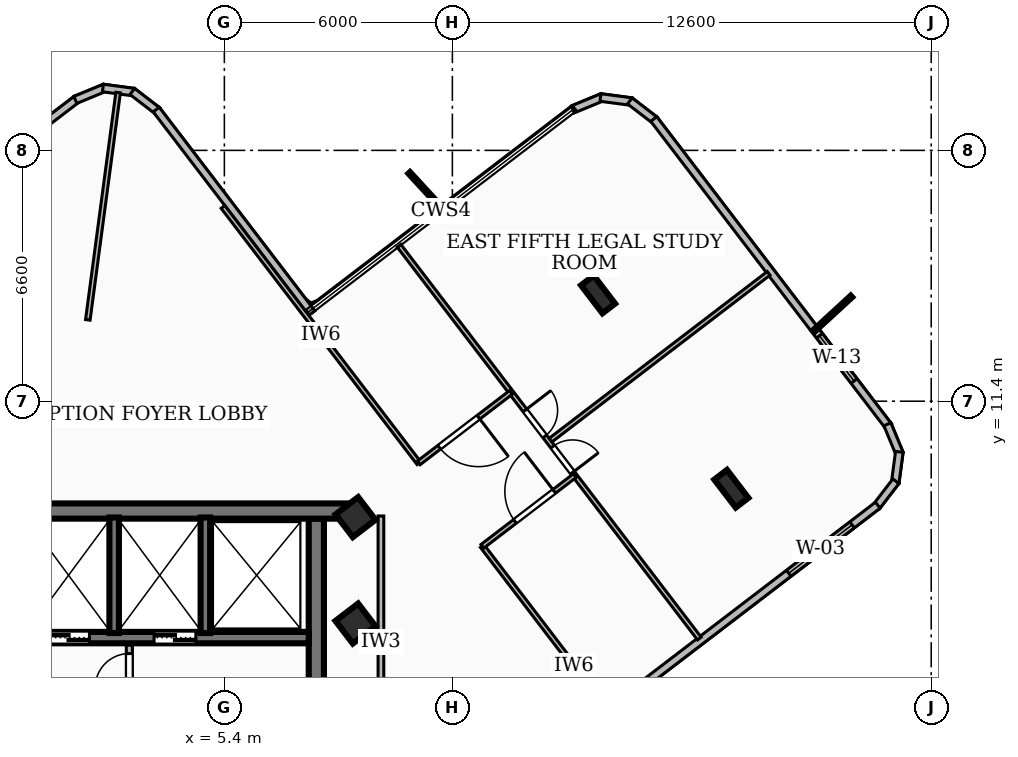
"""IFC4 building model, lengths in metres.
Left out: names, types, materials, properties, quantities, classifications, styles, units other than length and angle.
Written with IfcOpenShell. Run it as: python <this file> out.ifc"""

import sys

from ifc_helpers import new_model, si_unit, direction, frame, frame_2d, origin, origin_2d, place, context, subcontext, project, spatial, rectangle, i_section, extrude, element, fill, save


model = new_model("IFC4")
c1 = context("Model", 3, precision=1e-05, world=origin(), true_north=direction((0.0, 1.0)))
c2 = subcontext(c1, "Body", "Model", "MODEL_VIEW")
j1 = project(units=[si_unit("LENGTHUNIT", "METRE"), si_unit("PLANEANGLEUNIT", "RADIAN")], contexts=[c1])
p1 = place(None, origin())
s1 = spatial("IfcSite", under=j1, at=p1, CompositionType="ELEMENT")
p2 = place(p1, origin())
s2 = spatial("IfcBuilding", under=s1, at=p2, CompositionType="ELEMENT")
p3 = place(p2, frame((0.0, 0.0, 232.56)))
s3 = spatial("IfcBuildingStorey", under=s2, at=p3, CompositionType="ELEMENT", Elevation=232.56)
p4 = place(p3, frame((-8.78, 8.51, 0.0), z_axis=(0.0, 0.0, 1.0), x_axis=(1.0, 0.0, 0.0)))
e1 = element("IfcWall", 1, at=p4, inside=s3, PredefinedType="SHEAR", context=c2, shape_type="SweptSolid", body=[
    extrude(rectangle(XDim=17.56, YDim=0.4, at=frame_2d((8.78, 0.0))), origin(), (0.0, 0.0, 1.0), 3.14),
])
p5 = place(p3, frame((7.82, 8.31, 0.0), z_axis=(0.0, 0.0, 1.0), x_axis=(0.0, -1.0, 0.0)))
e2 = element("IfcWall", 2, at=p5, inside=s3, PredefinedType="SHEAR", context=c2, shape_type="SweptSolid", body=[
    extrude(rectangle(XDim=6.36, YDim=0.4, at=frame_2d((3.18, 0.0))), origin(), (0.0, 0.0, 1.0), 3.14),
])
p6 = place(p3, frame((7.62, 5.18, 0.0), z_axis=(0.0, 0.0, 1.0), x_axis=(-1.0, 0.0, 0.0)))
e3 = element("IfcWall", 3, at=p6, inside=s3, PredefinedType="SOLIDWALL", context=c2, shape_type="SweptSolid", body=[
    extrude(rectangle(XDim=15.24, YDim=0.3, at=frame_2d((7.62, 0.0))), origin(), (0.0, 0.0, 1.0), 3.14),
])
p7 = place(p6, frame((5.77, 0.0, 0.0)))
e4 = element("IfcOpeningElement", 4, at=p7, cuts=e3, PredefinedType="OPENING", context=c2, shape_type="SweptSolid", body=[
    extrude(rectangle(XDim=1.1, YDim=2.15, at=frame_2d((0.55, 1.075))), frame((0.0, 0.16, 0.0), z_axis=(0.0, -1.0, 0.0), x_axis=(1.0, 0.0, 0.0)), (0.0, 0.0, 1.0), 0.32),
])
p8 = place(p6, frame((2.97, 0.0, 0.0)))
e5 = element("IfcOpeningElement", 5, at=p8, cuts=e3, PredefinedType="OPENING", context=c2, shape_type="SweptSolid", body=[
    extrude(rectangle(XDim=1.1, YDim=2.15, at=frame_2d((0.55, 1.075))), frame((0.0, 0.16, 0.0), z_axis=(0.0, -1.0, 0.0), x_axis=(1.0, 0.0, 0.0)), (0.0, 0.0, 1.0), 0.32),
])
p9 = place(p6, frame((7.97, 0.0, 0.0)))
e6 = element("IfcOpeningElement", 6, at=p9, cuts=e3, PredefinedType="OPENING", context=c2, shape_type="SweptSolid", body=[
    extrude(rectangle(XDim=1.0, YDim=2.1, at=frame_2d((0.5, 1.05))), frame((0.0, 0.16, 0.0), z_axis=(0.0, -1.0, 0.0), x_axis=(1.0, 0.0, 0.0)), (0.0, 0.0, 1.0), 0.32),
])
for number, where, z_axis, x_axis in (
    (7, (2.5, 5.3, 0.0), (0.0, 0.0, 1.0), (0.0, 1.0, 0.0)),
    (8, (4.9, 5.3, 0.0), (0.0, 0.0, 1.0), (0.0, 1.0, 0.0)),
):
    element("IfcWall", number, at=place(p3, frame(where, z_axis=z_axis, x_axis=x_axis)), inside=s3, PredefinedType="SOLIDWALL", context=c2, shape_type="SweptSolid", body=[
        extrude(rectangle(XDim=3.04, YDim=0.25, at=frame_2d((1.52, 0.0))), origin(), (0.0, 0.0, 1.0), 3.14),
    ])
for number, where, z_axis, x_axis in (
    (9, (8.85, 5.55, 0.0), (0.0, 0.0, 1.0), (0.794, 0.607, 0.0)),
    (10, (8.85, 8.35, 0.0), (0.0, 0.0, 1.0), (0.794, 0.607, 0.0)),
):
    element("IfcColumn", number, at=place(p3, frame(where, z_axis=z_axis, x_axis=x_axis)), inside=s3, PredefinedType="COLUMN", context=c2, shape_type="SweptSolid", body=[
        extrude(rectangle(XDim=0.75, YDim=0.75, at=origin_2d()), origin(), (0.0, 0.0, 1.0), 3.42),
    ])
for number, where, z_axis, x_axis in (
    (11, (18.741, 9.097, 0.0), (0.0, 0.0, 1.0), (0.794, 0.607, 0.0)),
    (12, (15.234, 14.209, 0.0), (0.0, 0.0, 1.0), (0.794, 0.607, 0.0)),
):
    element("IfcColumn", number, at=place(p3, frame(where, z_axis=z_axis, x_axis=x_axis)), inside=s3, PredefinedType="COLUMN", context=c2, shape_type="SweptSolid", body=[
        extrude(i_section(OverallWidth=0.418, OverallDepth=0.927, WebThickness=0.019, FlangeThickness=0.032, at=origin_2d()), origin(), (0.0, 0.0, 1.0), 3.42),
    ])
p10 = place(p3, frame((-3.406, 15.584, 0.0), z_axis=(0.0, 0.0, 1.0), x_axis=(0.794329901805, 0.60748663121, 0.0)))
e13 = element("IfcWall", 13, at=p10, inside=s3, PredefinedType="SOLIDWALL", context=c2, shape_type="SweptSolid", body=[
    extrude(rectangle(XDim=6.203, YDim=0.2, at=frame_2d((3.101, 0.0))), origin(), (0.0, 0.0, 1.0), 3.14),
])
p11 = place(p3, frame((1.478, 19.327, 0.0), z_axis=(0.0, 0.0, 1.0), x_axis=(0.924091394431, 0.382171551451, 0.0)))
e14 = element("IfcWall", 14, at=p11, inside=s3, PredefinedType="SOLIDWALL", context=c2, shape_type="SweptSolid", body=[
    extrude(rectangle(XDim=0.837, YDim=0.2, at=frame_2d((0.419, 0.0))), origin(), (0.0, 0.0, 1.0), 3.14),
])
p12 = place(p3, frame((2.204, 19.64, 0.0), z_axis=(0.0, 0.0, 1.0), x_axis=(0.99140789753, -0.130806653943, 0.0)))
e15 = element("IfcWall", 15, at=p12, inside=s3, PredefinedType="SOLIDWALL", context=c2, shape_type="SweptSolid", body=[
    extrude(rectangle(XDim=0.825, YDim=0.2, at=frame_2d((0.413, 0.0))), origin(), (0.0, 0.0, 1.0), 3.14),
])
p13 = place(p3, frame((2.977, 19.55, 0.0), z_axis=(0.0, 0.0, 1.0), x_axis=(0.792959338773, -0.609274558022, 0.0)))
e16 = element("IfcWall", 16, at=p13, inside=s3, PredefinedType="SOLIDWALL", context=c2, shape_type="SweptSolid", body=[
    extrude(rectangle(XDim=0.839, YDim=0.2, at=frame_2d((0.419, 0.0))), origin(), (0.0, 0.0, 1.0), 3.14),
])
p14 = place(p3, frame((3.607, 19.074, 0.0), z_axis=(0.0, 0.0, 1.0), x_axis=(0.607308983466, -0.794465731546, 0.0)))
e17 = element("IfcWall", 17, at=p14, inside=s3, PredefinedType="SOLIDWALL", context=c2, shape_type="SweptSolid", body=[
    extrude(rectangle(XDim=6.743, YDim=0.2, at=frame_2d((3.372, 0.0))), origin(), (0.0, 0.0, 1.0), 3.14),
])
p15 = place(p3, frame((14.57, 19.078, 0.0), z_axis=(0.0, 0.0, 1.0), x_axis=(0.92426142649, 0.38176015442, 0.0)))
e18 = element("IfcWall", 18, at=p15, inside=s3, PredefinedType="SOLIDWALL", context=c2, shape_type="SweptSolid", body=[
    extrude(rectangle(XDim=0.838, YDim=0.2, at=frame_2d((0.419, 0.0))), origin(), (0.0, 0.0, 1.0), 3.14),
])
p16 = place(p3, frame((15.297, 19.391, 0.0), z_axis=(0.0, 0.0, 1.0), x_axis=(0.991369477691, -0.131097516005, 0.0)))
e19 = element("IfcWall", 19, at=p16, inside=s3, PredefinedType="SOLIDWALL", context=c2, shape_type="SweptSolid", body=[
    extrude(rectangle(XDim=0.825, YDim=0.2, at=frame_2d((0.413, 0.0))), origin(), (0.0, 0.0, 1.0), 3.14),
])
p17 = place(p3, frame((16.07, 19.301, 0.0), z_axis=(0.0, 0.0, 1.0), x_axis=(0.792959338773, -0.609274558022, 0.0)))
e20 = element("IfcWall", 20, at=p17, inside=s3, PredefinedType="SOLIDWALL", context=c2, shape_type="SweptSolid", body=[
    extrude(rectangle(XDim=0.839, YDim=0.2, at=frame_2d((0.419, 0.0))), origin(), (0.0, 0.0, 1.0), 3.14),
])
p18 = place(p3, frame((16.7, 18.825, 0.0), z_axis=(0.0, 0.0, 1.0), x_axis=(0.607273554345, -0.794492813179, 0.0)))
e21 = element("IfcWall", 21, at=p18, inside=s3, PredefinedType="SOLIDWALL", context=c2, shape_type="SweptSolid", body=[
    extrude(rectangle(XDim=10.164, YDim=0.2, at=frame_2d((5.082, 0.0))), origin(), (0.0, 0.0, 1.0), 3.14),
])
p19 = place(p18, frame((7.178, 0.0, 0.85)))
e22 = element("IfcOpeningElement", 22, at=p19, cuts=e21, PredefinedType="OPENING", context=c2, shape_type="SweptSolid", body=[
    extrude(rectangle(XDim=1.5, YDim=1.8, at=frame_2d((0.75, 0.9))), frame((0.0, 0.11, 0.0), z_axis=(0.0, -1.0, 0.0), x_axis=(1.0, 0.0, 0.0)), (0.0, 0.0, 1.0), 0.22),
])
p20 = place(p3, frame((22.847, 10.793, 0.0), z_axis=(0.0, 0.0, 1.0), x_axis=(0.383166624649, -0.923679239647, 0.0)))
e23 = element("IfcWall", 23, at=p20, inside=s3, PredefinedType="SOLIDWALL", context=c2, shape_type="SweptSolid", body=[
    extrude(rectangle(XDim=0.838, YDim=0.2, at=frame_2d((0.419, 0.0))), origin(), (0.0, 0.0, 1.0), 3.14),
])
p21 = place(p3, frame((23.161, 10.067, 0.0), z_axis=(0.0, 0.0, 1.0), x_axis=(-0.131969898809, -0.991253724234, 0.0)))
e24 = element("IfcWall", 24, at=p21, inside=s3, PredefinedType="SOLIDWALL", context=c2, shape_type="SweptSolid", body=[
    extrude(rectangle(XDim=0.825, YDim=0.2, at=frame_2d((0.413, 0.0))), origin(), (0.0, 0.0, 1.0), 3.14),
])
p22 = place(p3, frame((23.07, 9.294, 0.0), z_axis=(0.0, 0.0, 1.0), x_axis=(-0.609274558022, -0.792959338773, 0.0)))
e25 = element("IfcWall", 25, at=p22, inside=s3, PredefinedType="SOLIDWALL", context=c2, shape_type="SweptSolid", body=[
    extrude(rectangle(XDim=0.839, YDim=0.2, at=frame_2d((0.419, 0.0))), origin(), (0.0, 0.0, 1.0), 3.14),
])
p23 = place(p3, frame((22.594, 8.664, 0.0), z_axis=(0.0, 0.0, 1.0), x_axis=(-0.794406416539, -0.607386569954, 0.0)))
e26 = element("IfcWall", 26, at=p23, inside=s3, PredefinedType="SOLIDWALL", context=c2, shape_type="SweptSolid", body=[
    extrude(rectangle(XDim=8.843, YDim=0.2, at=frame_2d((4.421, 0.0))), origin(), (0.0, 0.0, 1.0), 3.14),
])
p24 = place(p23, frame((0.85, 0.0, 0.85)))
e27 = element("IfcOpeningElement", 27, at=p24, cuts=e26, PredefinedType="OPENING", context=c2, shape_type="SweptSolid", body=[
    extrude(rectangle(XDim=2.1, YDim=2.0, at=frame_2d((1.05, 1.0))), frame((0.0, 0.11, 0.0), z_axis=(0.0, -1.0, 0.0), x_axis=(1.0, 0.0, 0.0)), (0.0, 0.0, 1.0), 0.22),
])
p25 = place(p3, frame((2.9, 2.04, 0.0), z_axis=(0.0, 0.0, 1.0), x_axis=(0.0, 1.0, 0.0)))
e28 = element("IfcWall", 28, at=p25, inside=s3, PredefinedType="PARTITIONING", context=c2, shape_type="SweptSolid", body=[
    extrude(rectangle(XDim=2.94, YDim=0.16, at=frame_2d((1.47, 0.0))), origin(), (0.0, 0.0, 1.0), 2.37),
])
p26 = place(p25, frame((1.82, 0.0, 0.0)))
e29 = element("IfcOpeningElement", 29, at=p26, cuts=e28, PredefinedType="OPENING", context=c2, shape_type="SweptSolid", body=[
    extrude(rectangle(XDim=0.9, YDim=2.06, at=frame_2d((0.45, 1.03))), frame((0.0, 0.09, 0.0), z_axis=(0.0, -1.0, 0.0), x_axis=(1.0, 0.0, 0.0)), (0.0, 0.0, 1.0), 0.18),
])
p27 = place(p3, frame((9.52, 1.75, 0.0), z_axis=(0.0, 0.0, 1.0), x_axis=(0.0, 1.0, 0.0)))
e30 = element("IfcWall", 30, at=p27, inside=s3, PredefinedType="PARTITIONING", context=c2, shape_type="SweptSolid", body=[
    extrude(rectangle(XDim=6.63, YDim=0.15, at=frame_2d((3.315, 0.0))), origin(), (0.0, 0.0, 1.0), 2.51),
])
p28 = place(p3, frame((1.807, 13.54, 0.0), z_axis=(0.0, 0.0, 1.0), x_axis=(0.132245865303, 0.991216944523, 0.0)))
e31 = element("IfcWall", 31, at=p28, inside=s3, PredefinedType="PARTITIONING", context=c2, shape_type="SweptSolid", body=[
    extrude(rectangle(XDim=6.035, YDim=0.12, at=frame_2d((3.018, 0.0))), origin(), (0.0, 0.0, 1.0), 3.14),
])
p29 = place(p3, frame((10.52, 9.768, 0.0), z_axis=(0.0, 0.0, 1.0), x_axis=(-0.607441568234, 0.794364362985, 0.0)))
e32 = element("IfcWall", 32, at=p29, inside=s3, PredefinedType="PARTITIONING", context=c2, shape_type="SweptSolid", body=[
    extrude(rectangle(XDim=8.49, YDim=0.12, at=frame_2d((4.245, 0.0))), origin(), (0.0, 0.0, 1.0), 2.51),
])
p30 = place(p3, frame((17.012, 1.275, 0.0), z_axis=(0.0, 0.0, 1.0), x_axis=(-0.60728139249, 0.794486822003, 0.0)))
e33 = element("IfcWall", 33, at=p30, inside=s3, PredefinedType="PARTITIONING", context=c2, shape_type="SweptSolid", body=[
    extrude(rectangle(XDim=7.95, YDim=0.12, at=frame_2d((3.975, 0.0))), origin(), (0.0, 0.0, 1.0), 3.14),
])
p31 = place(p3, frame((12.945, 11.634, 0.0), z_axis=(0.0, 0.0, 1.0), x_axis=(-0.794509541066, -0.607251668714, 0.0)))
e34 = element("IfcWall", 34, at=p31, inside=s3, PredefinedType="PARTITIONING", context=c2, shape_type="SweptSolid", body=[
    extrude(rectangle(XDim=3.06, YDim=0.12, at=frame_2d((1.53, 0.0))), origin(), (0.0, 0.0, 1.0), 2.51),
])
p32 = place(p31, frame((1.08, 0.0, 0.0)))
e35 = element("IfcOpeningElement", 35, at=p32, cuts=e34, PredefinedType="OPENING", context=c2, shape_type="SweptSolid", body=[
    extrude(rectangle(XDim=1.3, YDim=2.1, at=frame_2d((0.65, 1.05))), frame((0.0, 0.07, 0.0), z_axis=(0.0, -1.0, 0.0), x_axis=(1.0, 0.0, 0.0)), (0.0, 0.0, 1.0), 0.14),
])
p33 = place(p3, frame((12.19, 7.583, 0.0), z_axis=(0.0, 0.0, 1.0), x_axis=(0.794394061013, 0.607402729519, 0.0)))
e36 = element("IfcWall", 36, at=p33, inside=s3, PredefinedType="PARTITIONING", context=c2, shape_type="SweptSolid", body=[
    extrude(rectangle(XDim=3.06, YDim=0.12, at=frame_2d((1.53, 0.0))), origin(), (0.0, 0.0, 1.0), 2.51),
])
p34 = place(p33, frame((1.08, 0.0, 0.0)))
e37 = element("IfcOpeningElement", 37, at=p34, cuts=e36, PredefinedType="OPENING", context=c2, shape_type="SweptSolid", body=[
    extrude(rectangle(XDim=1.3, YDim=2.1, at=frame_2d((0.65, 1.05))), frame((0.0, 0.07, 0.0), z_axis=(0.0, -1.0, 0.0), x_axis=(1.0, 0.0, 0.0)), (0.0, 0.0, 1.0), 0.14),
])
p35 = place(p3, frame((13.983, 10.376, 0.0), z_axis=(0.0, 0.0, 1.0), x_axis=(0.794405792036, 0.607387386747, 0.0)))
e38 = element("IfcWall", 38, at=p35, inside=s3, PredefinedType="PARTITIONING", context=c2, shape_type="SweptSolid", body=[
    extrude(rectangle(XDim=7.224, YDim=0.12, at=frame_2d((3.612, 0.0))), origin(), (0.0, 0.0, 1.0), 3.14),
])
p36 = place(p3, frame((9.996, 15.491, 0.0), z_axis=(0.0, 0.0, 1.0), x_axis=(0.607384628916, -0.794407900613, 0.0)))
e39 = element("IfcWall", 39, at=p36, inside=s3, PredefinedType="PARTITIONING", context=c2, shape_type="SweptSolid", body=[
    extrude(rectangle(XDim=13.01, YDim=0.12, at=frame_2d((6.505, 0.0))), origin(), (0.0, 0.0, 1.0), 2.51),
])
p37 = place(p36, frame((6.655, 0.0, 0.0)))
e40 = element("IfcOpeningElement", 40, at=p37, cuts=e39, PredefinedType="OPENING", context=c2, shape_type="SweptSolid", body=[
    extrude(rectangle(XDim=0.86, YDim=2.04, at=frame_2d((0.43, 1.02))), frame((0.0, 0.07, 0.0), z_axis=(0.0, -1.0, 0.0), x_axis=(1.0, 0.0, 0.0)), (0.0, 0.0, 1.0), 0.14),
])
p38 = place(p36, frame((5.455, 0.0, 0.0)))
e41 = element("IfcOpeningElement", 41, at=p38, cuts=e39, PredefinedType="OPENING", context=c2, shape_type="SweptSolid", body=[
    extrude(rectangle(XDim=0.86, YDim=2.04, at=frame_2d((0.43, 1.02))), frame((0.0, 0.07, 0.0), z_axis=(0.0, -1.0, 0.0), x_axis=(1.0, 0.0, 0.0)), (0.0, 0.0, 1.0), 0.14),
])
p39 = place(p19, origin())
e42 = element("IfcWindow", 42, at=p39, inside=s3, PartitioningType="SINGLE_PANEL", PredefinedType="WINDOW", context=c2, shape_type="SweptSolid", body=[
    extrude(rectangle(XDim=1.5, YDim=1.8, at=frame_2d((0.75, 0.9))), frame((0.0, 0.03, 0.0), z_axis=(0.0, -1.0, 0.0), x_axis=(1.0, 0.0, 0.0)), (0.0, 0.0, 1.0), 0.06),
])
fill(e22, e42)
p40 = place(p24, origin())
e43 = element("IfcWindow", 43, at=p40, inside=s3, PartitioningType="SINGLE_PANEL", PredefinedType="WINDOW", context=c2, shape_type="SweptSolid", body=[
    extrude(rectangle(XDim=2.1, YDim=2.0, at=frame_2d((1.05, 1.0))), frame((0.0, 0.03, 0.0), z_axis=(0.0, -1.0, 0.0), x_axis=(1.0, 0.0, 0.0)), (0.0, 0.0, 1.0), 0.06),
])
fill(e27, e43)
p41 = place(p7, origin())
e44 = element("IfcDoor", 44, at=p41, inside=s3, OperationType="DOUBLE_DOOR_SLIDING", PredefinedType="DOOR", context=c2, shape_type="SweptSolid", body=[
    extrude(rectangle(XDim=1.1, YDim=2.15, at=frame_2d((0.55, 1.075))), frame((0.0, 0.025, 0.0), z_axis=(0.0, -1.0, 0.0), x_axis=(1.0, 0.0, 0.0)), (0.0, 0.0, 1.0), 0.05),
])
fill(e4, e44)
p42 = place(p8, origin())
e45 = element("IfcDoor", 45, at=p42, inside=s3, OperationType="DOUBLE_DOOR_SLIDING", PredefinedType="DOOR", context=c2, shape_type="SweptSolid", body=[
    extrude(rectangle(XDim=1.1, YDim=2.15, at=frame_2d((0.55, 1.075))), frame((0.0, 0.025, 0.0), z_axis=(0.0, -1.0, 0.0), x_axis=(1.0, 0.0, 0.0)), (0.0, 0.0, 1.0), 0.05),
])
fill(e5, e45)
p43 = place(p26, origin())
e46 = element("IfcDoor", 46, at=p43, inside=s3, OperationType="SINGLE_SWING_LEFT", PredefinedType="DOOR", context=c2, shape_type="SweptSolid", body=[
    extrude(rectangle(XDim=0.9, YDim=2.06, at=frame_2d((0.45, 1.03))), frame((0.0, 0.025, 0.0), z_axis=(0.0, -1.0, 0.0), x_axis=(1.0, 0.0, 0.0)), (0.0, 0.0, 1.0), 0.05),
])
fill(e29, e46)
p44 = place(p32, origin())
e47 = element("IfcDoor", 47, at=p44, inside=s3, OperationType="SINGLE_SWING_LEFT", PredefinedType="DOOR", context=c2, shape_type="SweptSolid", body=[
    extrude(rectangle(XDim=1.3, YDim=2.1, at=frame_2d((0.65, 1.05))), frame((0.0, 0.025, 0.0), z_axis=(0.0, -1.0, 0.0), x_axis=(1.0, 0.0, 0.0)), (0.0, 0.0, 1.0), 0.05),
])
fill(e35, e47)
p45 = place(p34, origin())
e48 = element("IfcDoor", 48, at=p45, inside=s3, OperationType="SINGLE_SWING_RIGHT", PredefinedType="DOOR", context=c2, shape_type="SweptSolid", body=[
    extrude(rectangle(XDim=1.3, YDim=2.1, at=frame_2d((0.65, 1.05))), frame((0.0, 0.025, 0.0), z_axis=(0.0, -1.0, 0.0), x_axis=(1.0, 0.0, 0.0)), (0.0, 0.0, 1.0), 0.05),
])
fill(e37, e48)
p46 = place(p37, origin())
e49 = element("IfcDoor", 49, at=p46, inside=s3, OperationType="SINGLE_SWING_RIGHT", PredefinedType="DOOR", context=c2, shape_type="SweptSolid", body=[
    extrude(rectangle(XDim=0.86, YDim=2.04, at=frame_2d((0.43, 1.02))), frame((0.0, 0.025, 0.0), z_axis=(0.0, -1.0, 0.0), x_axis=(1.0, 0.0, 0.0)), (0.0, 0.0, 1.0), 0.05),
])
fill(e40, e49)
p47 = place(p38, origin())
e50 = element("IfcDoor", 50, at=p47, inside=s3, OperationType="SINGLE_SWING_LEFT", PredefinedType="DOOR", context=c2, shape_type="SweptSolid", body=[
    extrude(rectangle(XDim=0.86, YDim=2.04, at=frame_2d((0.43, 1.02))), frame((0.0, 0.025, 0.0), z_axis=(0.0, -1.0, 0.0), x_axis=(1.0, 0.0, 0.0)), (0.0, 0.0, 1.0), 0.05),
])
fill(e41, e50)
save(model, sys.argv[1])
